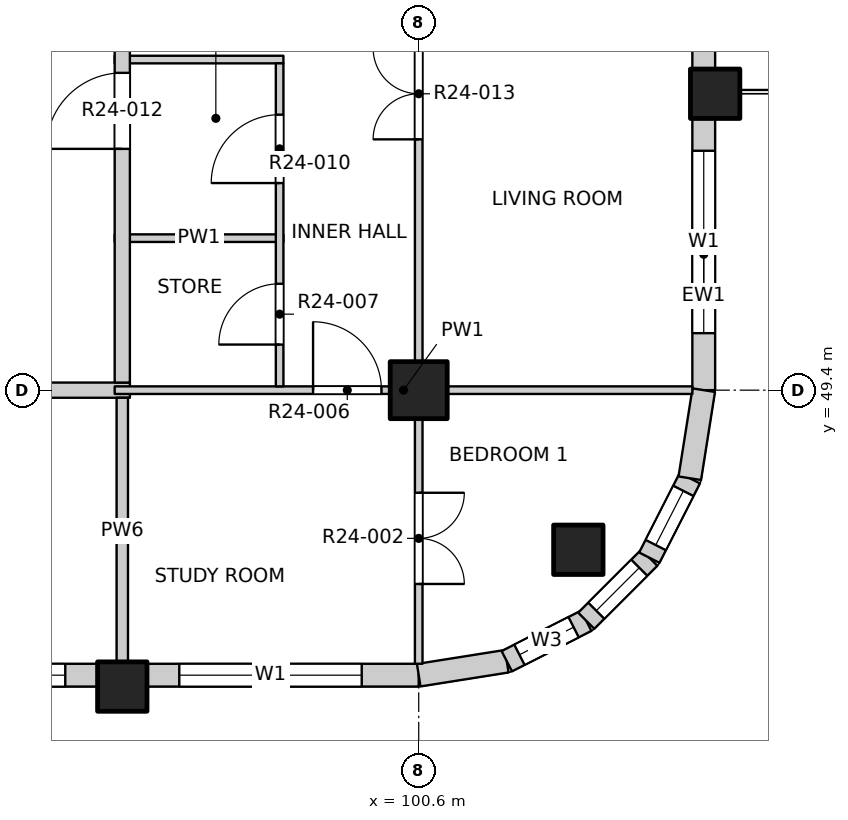
"""IFC4 building model, lengths in metres.
Left out: names, types, materials, properties, quantities, classifications, styles, units other than length and angle.
Written with IfcOpenShell. Run it as: python <this file> out.ifc"""

import sys

from ifc_helpers import new_model, si_unit, direction, frame, frame_2d, origin, origin_2d, place, context, subcontext, project, spatial, rectangle, extrude, element, fill, save


model = new_model("IFC4")
c1 = context("Model", 3, precision=1e-05, world=origin(), true_north=direction((0.0, 1.0)))
c2 = subcontext(c1, "Body", "Model", "MODEL_VIEW")
j1 = project(units=[si_unit("LENGTHUNIT", "METRE"), si_unit("PLANEANGLEUNIT", "RADIAN")], contexts=[c1])
p1 = place(None, origin())
s1 = spatial("IfcSite", under=j1, at=p1, CompositionType="ELEMENT")
p2 = place(p1, origin())
s2 = spatial("IfcBuilding", under=s1, at=p2, CompositionType="ELEMENT")
p3 = place(p2, frame((0.0, 0.0, 249.4)))
s3 = spatial("IfcBuildingStorey", under=s2, at=p3, CompositionType="ELEMENT", Elevation=249.4)
for number, where, z_axis, x_axis in (
    (1, (102.7, 47.3, -0.25), (0.0, 0.0, 1.0), (1.0, 0.0, 0.0)),
    (2, (104.5, 53.3, -0.25), (0.0, 0.0, 1.0), (1.0, 0.0, 0.0)),
    (3, (96.7, 45.5, -0.25), (0.0, 0.0, 1.0), (1.0, 0.0, 0.0)),
):
    element("IfcColumn", number, at=place(p3, frame(where, z_axis=z_axis, x_axis=x_axis)), inside=s3, PredefinedType="COLUMN", context=c2, shape_type="SweptSolid", body=[
        extrude(rectangle(XDim=0.65, YDim=0.65, at=origin_2d()), origin(), (0.0, 0.0, 1.0), 3.4),
    ])
p4 = place(p3, frame((100.6, 49.4, -0.25), z_axis=(0.0, 0.0, 1.0), x_axis=(1.0, 0.0, 0.0)))
e4 = element("IfcColumn", 4, at=p4, inside=s3, PredefinedType="COLUMN", context=c2, shape_type="SweptSolid", body=[
    extrude(rectangle(XDim=0.75, YDim=0.75, at=origin_2d()), origin(), (0.0, 0.0, 1.0), 3.4),
])
p5 = place(p3, frame((89.225, 45.65, 0.0), z_axis=(0.0, 0.0, 1.0), x_axis=(1.0, 0.0, 0.0)))
e5 = element("IfcWall", 5, at=p5, inside=s3, PredefinedType="SOLIDWALL", context=c2, shape_type="SweptSolid", body=[
    extrude(rectangle(XDim=7.15, YDim=0.3, at=frame_2d((3.575, 0.0))), origin(), (0.0, 0.0, 1.0), 2.7),
])
p6 = place(p5, frame((0.425, 0.0, 0.9)))
e6 = element("IfcOpeningElement", 6, at=p6, cuts=e5, PredefinedType="OPENING", context=c2, shape_type="SweptSolid", body=[
    extrude(rectangle(XDim=2.4, YDim=1.8, at=frame_2d((1.2, 0.9))), frame((0.0, 0.16, 0.0), z_axis=(0.0, -1.0, 0.0), x_axis=(1.0, 0.0, 0.0)), (0.0, 0.0, 1.0), 0.32),
])
p7 = place(p5, frame((4.325, 0.0, 0.9)))
e7 = element("IfcOpeningElement", 7, at=p7, cuts=e5, PredefinedType="OPENING", context=c2, shape_type="SweptSolid", body=[
    extrude(rectangle(XDim=2.4, YDim=1.8, at=frame_2d((1.2, 0.9))), frame((0.0, 0.16, 0.0), z_axis=(0.0, -1.0, 0.0), x_axis=(1.0, 0.0, 0.0)), (0.0, 0.0, 1.0), 0.32),
])
p8 = place(p3, frame((97.025, 45.65, 0.0), z_axis=(0.0, 0.0, 1.0), x_axis=(1.0, 0.0, 0.0)))
e8 = element("IfcWall", 8, at=p8, inside=s3, PredefinedType="SOLIDWALL", context=c2, shape_type="SweptSolid", body=[
    extrude(rectangle(XDim=3.575, YDim=0.3, at=frame_2d((1.788, 0.0))), origin(), (0.0, 0.0, 1.0), 2.7),
])
p9 = place(p8, frame((0.425, 0.0, 0.9)))
e9 = element("IfcOpeningElement", 9, at=p9, cuts=e8, PredefinedType="OPENING", context=c2, shape_type="SweptSolid", body=[
    extrude(rectangle(XDim=2.4, YDim=1.8, at=frame_2d((1.2, 0.9))), frame((0.0, 0.16, 0.0), z_axis=(0.0, -1.0, 0.0), x_axis=(1.0, 0.0, 0.0)), (0.0, 0.0, 1.0), 0.32),
])
p10 = place(p3, frame((104.35, 49.4, 0.0), z_axis=(0.0, 0.0, 1.0), x_axis=(0.0, 1.0, 0.0)))
e10 = element("IfcWall", 10, at=p10, inside=s3, PredefinedType="SOLIDWALL", context=c2, shape_type="SweptSolid", body=[
    extrude(rectangle(XDim=3.575, YDim=0.3, at=frame_2d((1.788, 0.0))), origin(), (0.0, 0.0, 1.0), 2.7),
])
p11 = place(p10, frame((0.75, 0.0, 0.9)))
e11 = element("IfcOpeningElement", 11, at=p11, cuts=e10, PredefinedType="OPENING", context=c2, shape_type="SweptSolid", body=[
    extrude(rectangle(XDim=2.4, YDim=1.8, at=frame_2d((1.2, 0.9))), frame((0.0, 0.16, 0.0), z_axis=(0.0, -1.0, 0.0), x_axis=(1.0, 0.0, 0.0)), (0.0, 0.0, 1.0), 0.32),
])
p12 = place(p3, frame((104.35, 53.625, 0.0), z_axis=(0.0, 0.0, 1.0), x_axis=(0.0, 1.0, 0.0)))
e12 = element("IfcWall", 12, at=p12, inside=s3, PredefinedType="SOLIDWALL", context=c2, shape_type="SweptSolid", body=[
    extrude(rectangle(XDim=7.15, YDim=0.3, at=frame_2d((3.575, 0.0))), origin(), (0.0, 0.0, 1.0), 2.7),
])
p13 = place(p12, frame((0.725, 0.0, 0.0)))
e13 = element("IfcOpeningElement", 13, at=p13, cuts=e12, PredefinedType="OPENING", context=c2, shape_type="SweptSolid", body=[
    extrude(rectangle(XDim=1.8, YDim=2.4, at=frame_2d((0.9, 1.2))), frame((0.0, 0.16, 0.0), z_axis=(0.0, -1.0, 0.0), x_axis=(1.0, 0.0, 0.0)), (0.0, 0.0, 1.0), 0.32),
])
p14 = place(p12, frame((4.325, 0.0, 0.9)))
e14 = element("IfcOpeningElement", 14, at=p14, cuts=e12, PredefinedType="OPENING", context=c2, shape_type="SweptSolid", body=[
    extrude(rectangle(XDim=2.4, YDim=1.8, at=frame_2d((1.2, 0.9))), frame((0.0, 0.16, 0.0), z_axis=(0.0, -1.0, 0.0), x_axis=(1.0, 0.0, 0.0)), (0.0, 0.0, 1.0), 0.32),
])
p15 = place(p3, frame((100.6, 45.65, 0.0), z_axis=(0.0, 0.0, 1.0), x_axis=(0.987678452879, 0.156496880861, 0.0)))
e15 = element("IfcWall", 15, at=p15, inside=s3, PredefinedType="SOLIDWALL", context=c2, shape_type="SweptSolid", body=[
    extrude(rectangle(XDim=1.173, YDim=0.3, at=frame_2d((0.586, 0.0))), origin(), (0.0, 0.0, 1.0), 2.7),
])
p16 = place(p3, frame((101.759, 45.833, 0.0), z_axis=(0.0, 0.0, 1.0), x_axis=(0.890988677504, 0.454025524128, 0.0)))
e16 = element("IfcWall", 16, at=p16, inside=s3, PredefinedType="SOLIDWALL", context=c2, shape_type="SweptSolid", body=[
    extrude(rectangle(XDim=1.173, YDim=0.3, at=frame_2d((0.587, 0.0))), origin(), (0.0, 0.0, 1.0), 2.7),
])
p17 = place(p16, frame((0.187, 0.0, 0.9)))
e17 = element("IfcOpeningElement", 17, at=p17, cuts=e16, PredefinedType="OPENING", context=c2, shape_type="SweptSolid", body=[
    extrude(rectangle(XDim=0.8, YDim=1.2, at=frame_2d((0.4, 0.6))), frame((0.0, 0.16, 0.0), z_axis=(0.0, -1.0, 0.0), x_axis=(1.0, 0.0, 0.0)), (0.0, 0.0, 1.0), 0.32),
])
p18 = place(p3, frame((102.804, 46.366, 0.0), z_axis=(0.0, 0.0, 1.0), x_axis=(0.707106781187, 0.707106781187, 0.0)))
e18 = element("IfcWall", 18, at=p18, inside=s3, PredefinedType="SOLIDWALL", context=c2, shape_type="SweptSolid", body=[
    extrude(rectangle(XDim=1.173, YDim=0.3, at=frame_2d((0.586, 0.0))), origin(), (0.0, 0.0, 1.0), 2.7),
])
p19 = place(p18, frame((0.187, 0.0, 0.9)))
e19 = element("IfcOpeningElement", 19, at=p19, cuts=e18, PredefinedType="OPENING", context=c2, shape_type="SweptSolid", body=[
    extrude(rectangle(XDim=0.8, YDim=1.2, at=frame_2d((0.4, 0.6))), frame((0.0, 0.16, 0.0), z_axis=(0.0, -1.0, 0.0), x_axis=(1.0, 0.0, 0.0)), (0.0, 0.0, 1.0), 0.32),
])
p20 = place(p3, frame((103.634, 47.196, 0.0), z_axis=(0.0, 0.0, 1.0), x_axis=(0.454025524128, 0.890988677504, 0.0)))
e20 = element("IfcWall", 20, at=p20, inside=s3, PredefinedType="SOLIDWALL", context=c2, shape_type="SweptSolid", body=[
    extrude(rectangle(XDim=1.173, YDim=0.3, at=frame_2d((0.587, 0.0))), origin(), (0.0, 0.0, 1.0), 2.7),
])
p21 = place(p20, frame((0.187, 0.0, 0.9)))
e21 = element("IfcOpeningElement", 21, at=p21, cuts=e20, PredefinedType="OPENING", context=c2, shape_type="SweptSolid", body=[
    extrude(rectangle(XDim=0.8, YDim=1.2, at=frame_2d((0.4, 0.6))), frame((0.0, 0.16, 0.0), z_axis=(0.0, -1.0, 0.0), x_axis=(1.0, 0.0, 0.0)), (0.0, 0.0, 1.0), 0.32),
])
p22 = place(p3, frame((104.167, 48.241, 0.0), z_axis=(0.0, 0.0, 1.0), x_axis=(0.156496880861, 0.987678452879, 0.0)))
e22 = element("IfcWall", 22, at=p22, inside=s3, PredefinedType="SOLIDWALL", context=c2, shape_type="SweptSolid", body=[
    extrude(rectangle(XDim=1.173, YDim=0.3, at=frame_2d((0.586, 0.0))), origin(), (0.0, 0.0, 1.0), 2.7),
])
p23 = place(p3, frame((73.2, 49.4, 0.0), z_axis=(0.0, 0.0, 1.0), x_axis=(1.0, 0.0, 0.0)))
e23 = element("IfcWall", 23, at=p23, inside=s3, PredefinedType="PARTITIONING", context=c2, shape_type="SweptSolid", body=[
    extrude(rectangle(XDim=23.6, YDim=0.2, at=frame_2d((11.8, 0.0))), origin(), (0.0, 0.0, 1.0), 3.15),
])
p24 = place(p23, frame((7.3, 0.0, 0.0)))
e24 = element("IfcOpeningElement", 24, at=p24, cuts=e23, PredefinedType="OPENING", context=c2, shape_type="SweptSolid", body=[
    extrude(rectangle(XDim=1.2, YDim=2.1, at=frame_2d((0.6, 1.05))), frame((0.0, 0.11, 0.0), z_axis=(0.0, -1.0, 0.0), x_axis=(1.0, 0.0, 0.0)), (0.0, 0.0, 1.0), 0.22),
])
p25 = place(p23, frame((20.075, 0.0, 0.0)))
e25 = element("IfcOpeningElement", 25, at=p25, cuts=e23, PredefinedType="OPENING", context=c2, shape_type="SweptSolid", body=[
    extrude(rectangle(XDim=1.2, YDim=2.1, at=frame_2d((0.6, 1.05))), frame((0.0, 0.11, 0.0), z_axis=(0.0, -1.0, 0.0), x_axis=(1.0, 0.0, 0.0)), (0.0, 0.0, 1.0), 0.22),
])
p26 = place(p3, frame((96.6, 49.4, 0.0), z_axis=(0.0, 0.0, 1.0), x_axis=(1.0, 0.0, 0.0)))
e26 = element("IfcWall", 26, at=p26, inside=s3, PredefinedType="PARTITIONING", context=c2, shape_type="SweptSolid", body=[
    extrude(rectangle(XDim=7.6, YDim=0.1, at=frame_2d((3.8, 0.0))), origin(), (0.0, 0.0, 1.0), 3.15),
])
p27 = place(p26, frame((2.61, 0.0, 0.0)))
e27 = element("IfcOpeningElement", 27, at=p27, cuts=e26, PredefinedType="OPENING", context=c2, shape_type="SweptSolid", body=[
    extrude(rectangle(XDim=0.9, YDim=2.1, at=frame_2d((0.45, 1.05))), frame((0.0, 0.06, 0.0), z_axis=(0.0, -1.0, 0.0), x_axis=(1.0, 0.0, 0.0)), (0.0, 0.0, 1.0), 0.12),
])
for number, where, z_axis, x_axis in (
    (28, (96.6, 51.4, 0.0), (0.0, 0.0, 1.0), (1.0, 0.0, 0.0)),
    (29, (96.6, 53.75, 0.0), (0.0, 0.0, 1.0), (1.0, 0.0, 0.0)),
):
    element("IfcWall", number, at=place(p3, frame(where, z_axis=z_axis, x_axis=x_axis)), inside=s3, PredefinedType="PARTITIONING", context=c2, shape_type="SweptSolid", body=[
        extrude(rectangle(XDim=2.22, YDim=0.1, at=frame_2d((1.11, 0.0))), origin(), (0.0, 0.0, 1.0), 3.15),
    ])
p28 = place(p3, frame((96.7, 45.8, 0.0), z_axis=(0.0, 0.0, 1.0), x_axis=(0.0, 1.0, 0.0)))
e30 = element("IfcWall", 30, at=p28, inside=s3, PredefinedType="PARTITIONING", context=c2, shape_type="SweptSolid", body=[
    extrude(rectangle(XDim=3.5, YDim=0.15, at=frame_2d((1.75, 0.0))), origin(), (0.0, 0.0, 1.0), 3.15),
])
p29 = place(p3, frame((96.7, 49.5, 0.0), z_axis=(0.0, 0.0, 1.0), x_axis=(0.0, 1.0, 0.0)))
e31 = element("IfcWall", 31, at=p29, inside=s3, PredefinedType="PARTITIONING", context=c2, shape_type="SweptSolid", body=[
    extrude(rectangle(XDim=34.7, YDim=0.2, at=frame_2d((17.35, 0.0))), origin(), (0.0, 0.0, 1.0), 3.15),
])
p30 = place(p29, frame((3.075, 0.0, 0.0)))
e32 = element("IfcOpeningElement", 32, at=p30, cuts=e31, PredefinedType="OPENING", context=c2, shape_type="SweptSolid", body=[
    extrude(rectangle(XDim=1.0, YDim=2.1, at=frame_2d((0.5, 1.05))), frame((0.0, 0.11, 0.0), z_axis=(0.0, -1.0, 0.0), x_axis=(1.0, 0.0, 0.0)), (0.0, 0.0, 1.0), 0.22),
])
p31 = place(p29, frame((18.425, 0.0, 0.0)))
e33 = element("IfcOpeningElement", 33, at=p31, cuts=e31, PredefinedType="OPENING", context=c2, shape_type="SweptSolid", body=[
    extrude(rectangle(XDim=1.0, YDim=2.1, at=frame_2d((0.5, 1.05))), frame((0.0, 0.11, 0.0), z_axis=(0.0, -1.0, 0.0), x_axis=(1.0, 0.0, 0.0)), (0.0, 0.0, 1.0), 0.22),
])
p32 = place(p29, frame((25.825, 0.0, 0.0)))
e34 = element("IfcOpeningElement", 34, at=p32, cuts=e31, PredefinedType="OPENING", context=c2, shape_type="SweptSolid", body=[
    extrude(rectangle(XDim=1.0, YDim=2.1, at=frame_2d((0.5, 1.05))), frame((0.0, 0.11, 0.0), z_axis=(0.0, -1.0, 0.0), x_axis=(1.0, 0.0, 0.0)), (0.0, 0.0, 1.0), 0.22),
])
p33 = place(p3, frame((98.77, 49.45, 0.0), z_axis=(0.0, 0.0, 1.0), x_axis=(0.0, 1.0, 0.0)))
e35 = element("IfcWall", 35, at=p33, inside=s3, PredefinedType="PARTITIONING", context=c2, shape_type="SweptSolid", body=[
    extrude(rectangle(XDim=4.25, YDim=0.1, at=frame_2d((2.125, 0.0))), origin(), (0.0, 0.0, 1.0), 3.15),
])
p34 = place(p33, frame((0.55, 0.0, 0.0)))
e36 = element("IfcOpeningElement", 36, at=p34, cuts=e35, PredefinedType="OPENING", context=c2, shape_type="SweptSolid", body=[
    extrude(rectangle(XDim=0.8, YDim=2.1, at=frame_2d((0.4, 1.05))), frame((0.0, 0.06, 0.0), z_axis=(0.0, -1.0, 0.0), x_axis=(1.0, 0.0, 0.0)), (0.0, 0.0, 1.0), 0.12),
])
p35 = place(p33, frame((2.675, 0.0, 0.0)))
e37 = element("IfcOpeningElement", 37, at=p35, cuts=e35, PredefinedType="OPENING", context=c2, shape_type="SweptSolid", body=[
    extrude(rectangle(XDim=0.9, YDim=2.1, at=frame_2d((0.45, 1.05))), frame((0.0, 0.06, 0.0), z_axis=(0.0, -1.0, 0.0), x_axis=(1.0, 0.0, 0.0)), (0.0, 0.0, 1.0), 0.12),
])
p36 = place(p3, frame((100.6, 45.8, 0.0), z_axis=(0.0, 0.0, 1.0), x_axis=(0.0, 1.0, 0.0)))
e38 = element("IfcWall", 38, at=p36, inside=s3, PredefinedType="PARTITIONING", context=c2, shape_type="SweptSolid", body=[
    extrude(rectangle(XDim=38.4, YDim=0.1, at=frame_2d((19.2, 0.0))), origin(), (0.0, 0.0, 1.0), 3.15),
])
p37 = place(p36, frame((1.05, 0.0, 0.0)))
e39 = element("IfcOpeningElement", 39, at=p37, cuts=e38, PredefinedType="OPENING", context=c2, shape_type="SweptSolid", body=[
    extrude(rectangle(XDim=1.2, YDim=2.1, at=frame_2d((0.6, 1.05))), frame((0.0, 0.06, 0.0), z_axis=(0.0, -1.0, 0.0), x_axis=(1.0, 0.0, 0.0)), (0.0, 0.0, 1.0), 0.12),
])
p38 = place(p36, frame((6.9, 0.0, 0.0)))
e40 = element("IfcOpeningElement", 40, at=p38, cuts=e38, PredefinedType="OPENING", context=c2, shape_type="SweptSolid", body=[
    extrude(rectangle(XDim=1.2, YDim=2.1, at=frame_2d((0.6, 1.05))), frame((0.0, 0.06, 0.0), z_axis=(0.0, -1.0, 0.0), x_axis=(1.0, 0.0, 0.0)), (0.0, 0.0, 1.0), 0.12),
])
p39 = place(p36, frame((12.9, 0.0, 0.0)))
e41 = element("IfcOpeningElement", 41, at=p39, cuts=e38, PredefinedType="OPENING", context=c2, shape_type="SweptSolid", body=[
    extrude(rectangle(XDim=0.9, YDim=2.1, at=frame_2d((0.45, 1.05))), frame((0.0, 0.06, 0.0), z_axis=(0.0, -1.0, 0.0), x_axis=(1.0, 0.0, 0.0)), (0.0, 0.0, 1.0), 0.12),
])
p40 = place(p36, frame((16.8, 0.0, 0.0)))
e42 = element("IfcOpeningElement", 42, at=p40, cuts=e38, PredefinedType="OPENING", context=c2, shape_type="SweptSolid", body=[
    extrude(rectangle(XDim=0.9, YDim=2.1, at=frame_2d((0.45, 1.05))), frame((0.0, 0.06, 0.0), z_axis=(0.0, -1.0, 0.0), x_axis=(1.0, 0.0, 0.0)), (0.0, 0.0, 1.0), 0.12),
])
p41 = place(p36, frame((20.7, 0.0, 0.0)))
e43 = element("IfcOpeningElement", 43, at=p41, cuts=e38, PredefinedType="OPENING", context=c2, shape_type="SweptSolid", body=[
    extrude(rectangle(XDim=0.9, YDim=2.1, at=frame_2d((0.45, 1.05))), frame((0.0, 0.06, 0.0), z_axis=(0.0, -1.0, 0.0), x_axis=(1.0, 0.0, 0.0)), (0.0, 0.0, 1.0), 0.12),
])
p42 = place(p36, frame((24.6, 0.0, 0.0)))
e44 = element("IfcOpeningElement", 44, at=p42, cuts=e38, PredefinedType="OPENING", context=c2, shape_type="SweptSolid", body=[
    extrude(rectangle(XDim=0.9, YDim=2.1, at=frame_2d((0.45, 1.05))), frame((0.0, 0.06, 0.0), z_axis=(0.0, -1.0, 0.0), x_axis=(1.0, 0.0, 0.0)), (0.0, 0.0, 1.0), 0.12),
])
p43 = place(p36, frame((30.3, 0.0, 0.0)))
e45 = element("IfcOpeningElement", 45, at=p43, cuts=e38, PredefinedType="OPENING", context=c2, shape_type="SweptSolid", body=[
    extrude(rectangle(XDim=1.2, YDim=2.1, at=frame_2d((0.6, 1.05))), frame((0.0, 0.06, 0.0), z_axis=(0.0, -1.0, 0.0), x_axis=(1.0, 0.0, 0.0)), (0.0, 0.0, 1.0), 0.12),
])
p44 = place(p36, frame((36.15, 0.0, 0.0)))
e46 = element("IfcOpeningElement", 46, at=p44, cuts=e38, PredefinedType="OPENING", context=c2, shape_type="SweptSolid", body=[
    extrude(rectangle(XDim=1.2, YDim=2.1, at=frame_2d((0.6, 1.05))), frame((0.0, 0.06, 0.0), z_axis=(0.0, -1.0, 0.0), x_axis=(1.0, 0.0, 0.0)), (0.0, 0.0, 1.0), 0.12),
])
p45 = place(p7, origin())
e47 = element("IfcWindow", 47, at=p45, inside=s3, PartitioningType="DOUBLE_PANEL_VERTICAL", PredefinedType="WINDOW", context=c2, shape_type="SweptSolid", body=[
    extrude(rectangle(XDim=2.4, YDim=1.8, at=frame_2d((1.2, 0.9))), frame((0.0, 0.03, 0.0), z_axis=(0.0, -1.0, 0.0), x_axis=(1.0, 0.0, 0.0)), (0.0, 0.0, 1.0), 0.06),
])
fill(e7, e47)
p46 = place(p9, origin())
e48 = element("IfcWindow", 48, at=p46, inside=s3, PartitioningType="DOUBLE_PANEL_VERTICAL", PredefinedType="WINDOW", context=c2, shape_type="SweptSolid", body=[
    extrude(rectangle(XDim=2.4, YDim=1.8, at=frame_2d((1.2, 0.9))), frame((0.0, 0.03, 0.0), z_axis=(0.0, -1.0, 0.0), x_axis=(1.0, 0.0, 0.0)), (0.0, 0.0, 1.0), 0.06),
])
fill(e9, e48)
p47 = place(p11, origin())
e49 = element("IfcWindow", 49, at=p47, inside=s3, PartitioningType="DOUBLE_PANEL_VERTICAL", PredefinedType="WINDOW", context=c2, shape_type="SweptSolid", body=[
    extrude(rectangle(XDim=2.4, YDim=1.8, at=frame_2d((1.2, 0.9))), frame((0.0, 0.03, 0.0), z_axis=(0.0, -1.0, 0.0), x_axis=(1.0, 0.0, 0.0)), (0.0, 0.0, 1.0), 0.06),
])
fill(e11, e49)
p48 = place(p17, origin())
e50 = element("IfcWindow", 50, at=p48, inside=s3, PartitioningType="SINGLE_PANEL", PredefinedType="WINDOW", context=c2, shape_type="SweptSolid", body=[
    extrude(rectangle(XDim=0.8, YDim=1.2, at=frame_2d((0.4, 0.6))), frame((0.0, 0.03, 0.0), z_axis=(0.0, -1.0, 0.0), x_axis=(1.0, 0.0, 0.0)), (0.0, 0.0, 1.0), 0.06),
])
fill(e17, e50)
p49 = place(p19, origin())
e51 = element("IfcWindow", 51, at=p49, inside=s3, PartitioningType="SINGLE_PANEL", PredefinedType="WINDOW", context=c2, shape_type="SweptSolid", body=[
    extrude(rectangle(XDim=0.8, YDim=1.2, at=frame_2d((0.4, 0.6))), frame((0.0, 0.03, 0.0), z_axis=(0.0, -1.0, 0.0), x_axis=(1.0, 0.0, 0.0)), (0.0, 0.0, 1.0), 0.06),
])
fill(e19, e51)
p50 = place(p21, origin())
e52 = element("IfcWindow", 52, at=p50, inside=s3, PartitioningType="SINGLE_PANEL", PredefinedType="WINDOW", context=c2, shape_type="SweptSolid", body=[
    extrude(rectangle(XDim=0.8, YDim=1.2, at=frame_2d((0.4, 0.6))), frame((0.0, 0.03, 0.0), z_axis=(0.0, -1.0, 0.0), x_axis=(1.0, 0.0, 0.0)), (0.0, 0.0, 1.0), 0.06),
])
fill(e21, e52)
p51 = place(p37, origin())
e53 = element("IfcDoor", 53, at=p51, inside=s3, OperationType="DOUBLE_DOOR_SINGLE_SWING", PredefinedType="DOOR", context=c2, shape_type="SweptSolid", body=[
    extrude(rectangle(XDim=1.2, YDim=2.1, at=frame_2d((0.6, 1.05))), frame((0.0, 0.025, 0.0), z_axis=(0.0, -1.0, 0.0), x_axis=(1.0, 0.0, 0.0)), (0.0, 0.0, 1.0), 0.05),
])
fill(e39, e53)
p52 = place(p27, origin())
e54 = element("IfcDoor", 54, at=p52, inside=s3, OperationType="SINGLE_SWING_LEFT", PredefinedType="DOOR", context=c2, shape_type="SweptSolid", body=[
    extrude(rectangle(XDim=0.9, YDim=2.1, at=frame_2d((0.45, 1.05))), frame((0.0, 0.025, 0.0), z_axis=(0.0, -1.0, 0.0), x_axis=(1.0, 0.0, 0.0)), (0.0, 0.0, 1.0), 0.05),
])
fill(e27, e54)
p53 = place(p34, origin())
e55 = element("IfcDoor", 55, at=p53, inside=s3, OperationType="SINGLE_SWING_LEFT", PredefinedType="DOOR", context=c2, shape_type="SweptSolid", body=[
    extrude(rectangle(XDim=0.8, YDim=2.1, at=frame_2d((0.4, 1.05))), frame((0.0, 0.025, 0.0), z_axis=(0.0, -1.0, 0.0), x_axis=(1.0, 0.0, 0.0)), (0.0, 0.0, 1.0), 0.05),
])
fill(e36, e55)
p54 = place(p35, origin())
e56 = element("IfcDoor", 56, at=p54, inside=s3, OperationType="SINGLE_SWING_LEFT", PredefinedType="DOOR", context=c2, shape_type="SweptSolid", body=[
    extrude(rectangle(XDim=0.9, YDim=2.1, at=frame_2d((0.45, 1.05))), frame((0.0, 0.025, 0.0), z_axis=(0.0, -1.0, 0.0), x_axis=(1.0, 0.0, 0.0)), (0.0, 0.0, 1.0), 0.05),
])
fill(e37, e56)
p55 = place(p30, origin())
e57 = element("IfcDoor", 57, at=p55, inside=s3, OperationType="SINGLE_SWING_RIGHT", PredefinedType="DOOR", context=c2, shape_type="SweptSolid", body=[
    extrude(rectangle(XDim=1.0, YDim=2.1, at=frame_2d((0.5, 1.05))), frame((0.0, 0.025, 0.0), z_axis=(0.0, -1.0, 0.0), x_axis=(1.0, 0.0, 0.0)), (0.0, 0.0, 1.0), 0.05),
])
fill(e32, e57)
p56 = place(p38, origin())
e58 = element("IfcDoor", 58, at=p56, inside=s3, OperationType="DOUBLE_DOOR_SINGLE_SWING", PredefinedType="DOOR", context=c2, shape_type="SweptSolid", body=[
    extrude(rectangle(XDim=1.2, YDim=2.1, at=frame_2d((0.6, 1.05))), frame((0.0, 0.025, 0.0), z_axis=(0.0, -1.0, 0.0), x_axis=(1.0, 0.0, 0.0)), (0.0, 0.0, 1.0), 0.05),
])
fill(e40, e58)
save(model, sys.argv[1])
